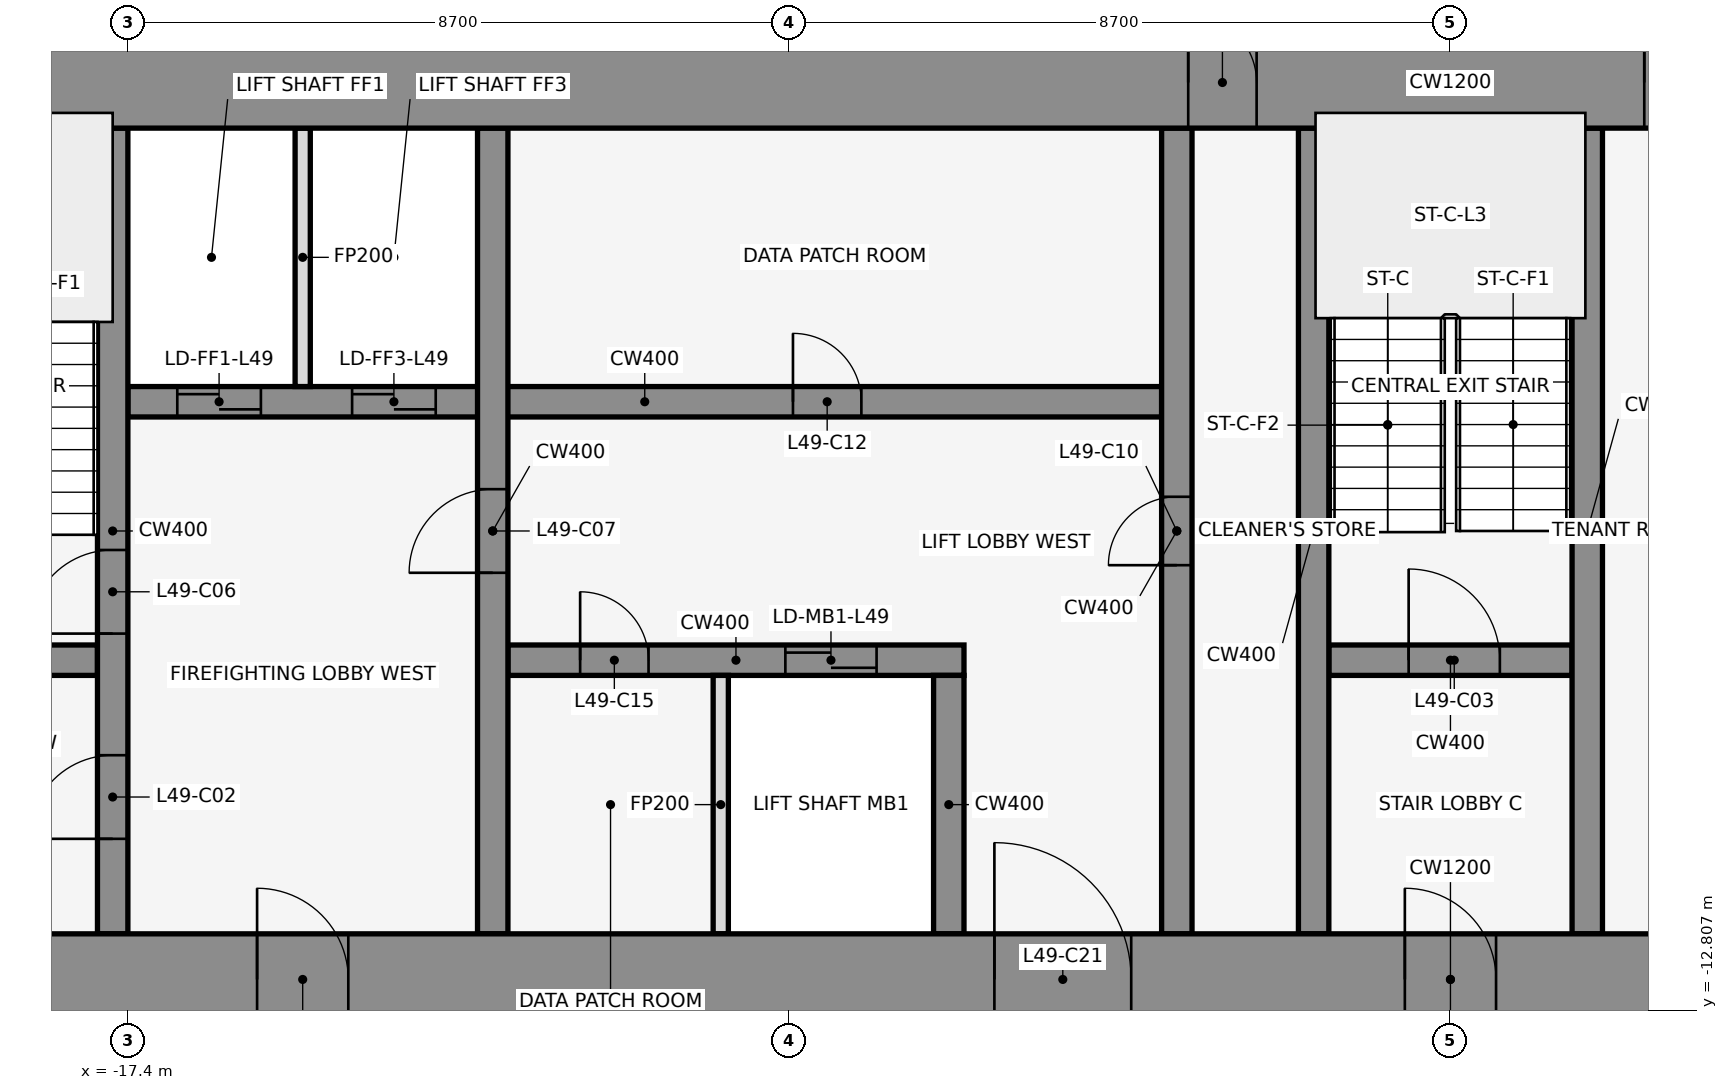
"""IFC4 building model, lengths in metres.
Left out: names, types, materials, properties, quantities, classifications, styles, units other than length and angle.
Written with IfcOpenShell. Run it as: python <this file> out.ifc"""

import sys

from ifc_helpers import new_model, si_unit, direction, frame, frame_2d, origin, place, context, subcontext, project, spatial, rectangle, extrude, element, fill, save


model = new_model("IFC4")
c1 = context("Model", 3, precision=1e-05, world=origin(), true_north=direction((0.0, 1.0)))
c2 = subcontext(c1, "Body", "Model", "MODEL_VIEW")
j1 = project(units=[si_unit("LENGTHUNIT", "METRE"), si_unit("PLANEANGLEUNIT", "RADIAN")], contexts=[c1])
p1 = place(None, origin())
s1 = spatial("IfcSite", under=j1, at=p1, CompositionType="ELEMENT")
p2 = place(p1, origin())
s2 = spatial("IfcBuilding", under=s1, at=p2, CompositionType="ELEMENT")
p3 = place(p2, frame((0.0, 0.0, 219.6)))
s3 = spatial("IfcBuildingStorey", under=s2, at=p3, CompositionType="ELEMENT", Elevation=219.6)
for number, where, z_axis, x_axis in (
    (1, (1.901, 1.08, 0.0), (0.0, 0.0, 1.0), (-0.84, -0.543, 0.0)),
    (2, (-0.068, -0.105, 0.0), (0.0, 0.0, 1.0), (-0.84, 0.543, 0.0)),
    (3, (-14.599, 1.08, 0.0), (0.0, 0.0, 1.0), (-0.84, -0.543, 0.0)),
):
    element("IfcWall", number, at=place(p3, frame(where, z_axis=z_axis, x_axis=x_axis)), inside=s3, PredefinedType="STANDARD", context=c2, shape_type="SweptSolid", body=[
        extrude(rectangle(XDim=2.183, YDim=0.25, at=frame_2d((1.091, 0.0))), origin(), (0.0, 0.0, 1.0), 3.95),
    ])
p4 = place(p3, frame((-20.8, -8.2, 0.0), z_axis=(0.0, 0.0, 1.0), x_axis=(1.0, 0.0, 0.0)))
e4 = element("IfcWall", 4, at=p4, inside=s3, PredefinedType="SHEAR", context=c2, shape_type="SweptSolid", body=[
    extrude(rectangle(XDim=3.0, YDim=0.4, at=frame_2d((1.5, 0.0))), origin(), (0.0, 0.0, 1.0), 4.1),
])
p5 = place(p4, frame((0.85, 0.0, 0.0)))
e5 = element("IfcOpeningElement", 5, at=p5, cuts=e4, PredefinedType="OPENING", context=c2, shape_type="SweptSolid", body=[
    extrude(rectangle(XDim=1.2, YDim=2.1, at=frame_2d((0.6, 1.05))), frame((0.0, 0.212, 0.0), z_axis=(0.0, -1.0, 0.0), x_axis=(1.0, 0.0, 0.0)), (0.0, 0.0, 1.0), 0.424),
])
p6 = place(p3, frame((-12.4, -8.2, 0.0), z_axis=(0.0, 0.0, 1.0), x_axis=(1.0, 0.0, 0.0)))
e6 = element("IfcWall", 6, at=p6, inside=s3, PredefinedType="SHEAR", context=c2, shape_type="SweptSolid", body=[
    extrude(rectangle(XDim=6.0, YDim=0.4, at=frame_2d((3.0, 0.0))), origin(), (0.0, 0.0, 1.0), 4.1),
])
p7 = place(p6, frame((3.65, 0.0, 0.0)))
e7 = element("IfcOpeningElement", 7, at=p7, cuts=e6, PredefinedType="OPENING", context=c2, shape_type="SweptSolid", body=[
    extrude(rectangle(XDim=1.2, YDim=2.1, at=frame_2d((0.6, 1.05))), frame((0.0, 0.212, 0.0), z_axis=(0.0, -1.0, 0.0), x_axis=(1.0, 0.0, 0.0)), (0.0, 0.0, 1.0), 0.424),
])
p8 = place(p6, frame((0.95, 0.0, 0.0)))
e8 = element("IfcOpeningElement", 8, at=p8, cuts=e6, PredefinedType="OPENING", context=c2, shape_type="SweptSolid", body=[
    extrude(rectangle(XDim=0.9, YDim=2.1, at=frame_2d((0.45, 1.05))), frame((0.0, 0.212, 0.0), z_axis=(0.0, -1.0, 0.0), x_axis=(1.0, 0.0, 0.0)), (0.0, 0.0, 1.0), 0.424),
])
p9 = place(p3, frame((-1.6, -8.2, 0.0), z_axis=(0.0, 0.0, 1.0), x_axis=(1.0, 0.0, 0.0)))
e9 = element("IfcWall", 9, at=p9, inside=s3, PredefinedType="SHEAR", context=c2, shape_type="SweptSolid", body=[
    extrude(rectangle(XDim=3.2, YDim=0.4, at=frame_2d((1.6, 0.0))), origin(), (0.0, 0.0, 1.0), 4.1),
])
p10 = place(p9, frame((1.05, 0.0, 0.0)))
e10 = element("IfcOpeningElement", 10, at=p10, cuts=e9, PredefinedType="OPENING", context=c2, shape_type="SweptSolid", body=[
    extrude(rectangle(XDim=1.2, YDim=2.1, at=frame_2d((0.6, 1.05))), frame((0.0, 0.212, 0.0), z_axis=(0.0, -1.0, 0.0), x_axis=(1.0, 0.0, 0.0)), (0.0, 0.0, 1.0), 0.424),
])
p11 = place(p3, frame((-17.4, -4.8, 0.0), z_axis=(0.0, 0.0, 1.0), x_axis=(1.0, 0.0, 0.0)))
e11 = element("IfcWall", 11, at=p11, inside=s3, PredefinedType="SHEAR", context=c2, shape_type="SweptSolid", body=[
    extrude(rectangle(XDim=13.6, YDim=0.4, at=frame_2d((6.8, 0.0))), origin(), (0.0, 0.0, 1.0), 4.1),
])
p12 = place(p11, frame((0.65, 0.0, 0.0)))
e12 = element("IfcOpeningElement", 12, at=p12, cuts=e11, PredefinedType="OPENING", context=c2, shape_type="SweptSolid", body=[
    extrude(rectangle(XDim=1.1, YDim=2.1, at=frame_2d((0.55, 1.05))), frame((0.0, 0.212, 0.0), z_axis=(0.0, -1.0, 0.0), x_axis=(1.0, 0.0, 0.0)), (0.0, 0.0, 1.0), 0.424),
])
p13 = place(p11, frame((2.95, 0.0, 0.0)))
e13 = element("IfcOpeningElement", 13, at=p13, cuts=e11, PredefinedType="OPENING", context=c2, shape_type="SweptSolid", body=[
    extrude(rectangle(XDim=1.1, YDim=2.1, at=frame_2d((0.55, 1.05))), frame((0.0, 0.212, 0.0), z_axis=(0.0, -1.0, 0.0), x_axis=(1.0, 0.0, 0.0)), (0.0, 0.0, 1.0), 0.424),
])
p14 = place(p11, frame((8.75, 0.0, 0.0)))
e14 = element("IfcOpeningElement", 14, at=p14, cuts=e11, PredefinedType="OPENING", context=c2, shape_type="SweptSolid", body=[
    extrude(rectangle(XDim=0.9, YDim=2.1, at=frame_2d((0.45, 1.05))), frame((0.0, 0.212, 0.0), z_axis=(0.0, -1.0, 0.0), x_axis=(1.0, 0.0, 0.0)), (0.0, 0.0, 1.0), 0.424),
])
p15 = place(p3, frame((-17.6, -11.8, 0.0), z_axis=(0.0, 0.0, 1.0), x_axis=(0.0, 1.0, 0.0)))
e15 = element("IfcWall", 15, at=p15, inside=s3, PredefinedType="SHEAR", context=c2, shape_type="SweptSolid", body=[
    extrude(rectangle(XDim=10.6, YDim=0.4, at=frame_2d((5.3, 0.0))), origin(), (0.0, 0.0, 1.0), 4.1),
])
p16 = place(p15, frame((1.25, 0.0, 0.0)))
e16 = element("IfcOpeningElement", 16, at=p16, cuts=e15, PredefinedType="OPENING", context=c2, shape_type="SweptSolid", body=[
    extrude(rectangle(XDim=1.1, YDim=2.1, at=frame_2d((0.55, 1.05))), frame((0.0, 0.212, 0.0), z_axis=(0.0, -1.0, 0.0), x_axis=(1.0, 0.0, 0.0)), (0.0, 0.0, 1.0), 0.424),
])
p17 = place(p15, frame((3.95, 0.0, 0.0)))
e17 = element("IfcOpeningElement", 17, at=p17, cuts=e15, PredefinedType="OPENING", context=c2, shape_type="SweptSolid", body=[
    extrude(rectangle(XDim=1.1, YDim=2.1, at=frame_2d((0.55, 1.05))), frame((0.0, 0.212, 0.0), z_axis=(0.0, -1.0, 0.0), x_axis=(1.0, 0.0, 0.0)), (0.0, 0.0, 1.0), 0.424),
])
p18 = place(p3, frame((-15.1, -4.6, 0.0), z_axis=(0.0, 0.0, 1.0), x_axis=(0.0, 1.0, 0.0)))
e18 = element("IfcWall", 18, at=p18, inside=s3, PredefinedType="PARTITIONING", context=c2, shape_type="SweptSolid", body=[
    extrude(rectangle(XDim=3.4, YDim=0.2, at=frame_2d((1.7, 0.0))), origin(), (0.0, 0.0, 1.0), 2.84),
])
p19 = place(p3, frame((-12.6, -11.8, 0.0), z_axis=(0.0, 0.0, 1.0), x_axis=(0.0, 1.0, 0.0)))
e19 = element("IfcWall", 19, at=p19, inside=s3, PredefinedType="SHEAR", context=c2, shape_type="SweptSolid", body=[
    extrude(rectangle(XDim=10.6, YDim=0.4, at=frame_2d((5.3, 0.0))), origin(), (0.0, 0.0, 1.0), 4.1),
])
p20 = place(p19, frame((4.75, 0.0, 0.0)))
e20 = element("IfcOpeningElement", 20, at=p20, cuts=e19, PredefinedType="OPENING", context=c2, shape_type="SweptSolid", body=[
    extrude(rectangle(XDim=1.1, YDim=2.1, at=frame_2d((0.55, 1.05))), frame((0.0, 0.212, 0.0), z_axis=(0.0, -1.0, 0.0), x_axis=(1.0, 0.0, 0.0)), (0.0, 0.0, 1.0), 0.424),
])
p21 = place(p3, frame((-9.6, -11.8, 0.0), z_axis=(0.0, 0.0, 1.0), x_axis=(0.0, 1.0, 0.0)))
e21 = element("IfcWall", 21, at=p21, inside=s3, PredefinedType="PARTITIONING", context=c2, shape_type="SweptSolid", body=[
    extrude(rectangle(XDim=3.4, YDim=0.2, at=frame_2d((1.7, 0.0))), origin(), (0.0, 0.0, 1.0), 2.84),
])
p22 = place(p3, frame((-6.6, -11.8, 0.0), z_axis=(0.0, 0.0, 1.0), x_axis=(0.0, 1.0, 0.0)))
e22 = element("IfcWall", 22, at=p22, inside=s3, PredefinedType="SHEAR", context=c2, shape_type="SweptSolid", body=[
    extrude(rectangle(XDim=3.4, YDim=0.4, at=frame_2d((1.7, 0.0))), origin(), (0.0, 0.0, 1.0), 4.1),
])
p23 = place(p3, frame((-3.6, -11.8, 0.0), z_axis=(0.0, 0.0, 1.0), x_axis=(0.0, 1.0, 0.0)))
e23 = element("IfcWall", 23, at=p23, inside=s3, PredefinedType="SHEAR", context=c2, shape_type="SweptSolid", body=[
    extrude(rectangle(XDim=10.6, YDim=0.4, at=frame_2d((5.3, 0.0))), origin(), (0.0, 0.0, 1.0), 4.1),
])
p24 = place(p23, frame((4.85, 0.0, 0.0)))
e24 = element("IfcOpeningElement", 24, at=p24, cuts=e23, PredefinedType="OPENING", context=c2, shape_type="SweptSolid", body=[
    extrude(rectangle(XDim=0.9, YDim=2.1, at=frame_2d((0.45, 1.05))), frame((0.0, 0.212, 0.0), z_axis=(0.0, -1.0, 0.0), x_axis=(1.0, 0.0, 0.0)), (0.0, 0.0, 1.0), 0.424),
])
for number, where, z_axis, x_axis in (
    (25, (-1.8, -11.8, 0.0), (0.0, 0.0, 1.0), (0.0, 1.0, 0.0)),
    (26, (1.8, -11.8, 0.0), (0.0, 0.0, 1.0), (0.0, 1.0, 0.0)),
):
    element("IfcWall", number, at=place(p3, frame(where, z_axis=z_axis, x_axis=x_axis)), inside=s3, PredefinedType="SHEAR", context=c2, shape_type="SweptSolid", body=[
        extrude(rectangle(XDim=10.6, YDim=0.4, at=frame_2d((5.3, 0.0))), origin(), (0.0, 0.0, 1.0), 4.1),
    ])
p25 = place(p3, frame((-22.0, -0.6, 0.0), z_axis=(0.0, 0.0, 1.0), x_axis=(1.0, 0.0, 0.0)))
e27 = element("IfcWall", 27, at=p25, inside=s3, PredefinedType="SHEAR", context=c2, shape_type="SweptSolid", body=[
    extrude(rectangle(XDim=44.0, YDim=1.2, at=frame_2d((22.0, 0.0))), origin(), (0.0, 0.0, 1.0), 4.1),
])
p26 = place(p25, frame((18.55, 0.0, 0.0)))
e28 = element("IfcOpeningElement", 28, at=p26, cuts=e27, PredefinedType="OPENING", context=c2, shape_type="SweptSolid", body=[
    extrude(rectangle(XDim=0.9, YDim=2.1, at=frame_2d((0.45, 1.05))), frame((0.0, 0.612, 0.0), z_axis=(0.0, -1.0, 0.0), x_axis=(1.0, 0.0, 0.0)), (0.0, 0.0, 1.0), 1.224),
])
p27 = place(p25, frame((24.55, 0.0, 0.0)))
e29 = element("IfcOpeningElement", 29, at=p27, cuts=e27, PredefinedType="OPENING", context=c2, shape_type="SweptSolid", body=[
    extrude(rectangle(XDim=0.9, YDim=2.1, at=frame_2d((0.45, 1.05))), frame((0.0, 0.612, 0.0), z_axis=(0.0, -1.0, 0.0), x_axis=(1.0, 0.0, 0.0)), (0.0, 0.0, 1.0), 1.224),
])
p28 = place(p3, frame((-22.0, -12.4, 0.0), z_axis=(0.0, 0.0, 1.0), x_axis=(1.0, 0.0, 0.0)))
e30 = element("IfcWall", 30, at=p28, inside=s3, PredefinedType="SHEAR", context=c2, shape_type="SweptSolid", body=[
    extrude(rectangle(XDim=44.0, YDim=1.2, at=frame_2d((22.0, 0.0))), origin(), (0.0, 0.0, 1.0), 4.1),
])
p29 = place(p28, frame((2.2, 0.0, 0.0)))
e31 = element("IfcOpeningElement", 31, at=p29, cuts=e30, PredefinedType="OPENING", context=c2, shape_type="SweptSolid", body=[
    extrude(rectangle(XDim=1.2, YDim=2.1, at=frame_2d((0.6, 1.05))), frame((0.0, 0.612, 0.0), z_axis=(0.0, -1.0, 0.0), x_axis=(1.0, 0.0, 0.0)), (0.0, 0.0, 1.0), 1.224),
])
p30 = place(p28, frame((21.4, 0.0, 0.0)))
e32 = element("IfcOpeningElement", 32, at=p30, cuts=e30, PredefinedType="OPENING", context=c2, shape_type="SweptSolid", body=[
    extrude(rectangle(XDim=1.2, YDim=2.1, at=frame_2d((0.6, 1.05))), frame((0.0, 0.612, 0.0), z_axis=(0.0, -1.0, 0.0), x_axis=(1.0, 0.0, 0.0)), (0.0, 0.0, 1.0), 1.224),
])
p31 = place(p28, frame((40.6, 0.0, 0.0)))
e33 = element("IfcOpeningElement", 33, at=p31, cuts=e30, PredefinedType="OPENING", context=c2, shape_type="SweptSolid", body=[
    extrude(rectangle(XDim=1.2, YDim=2.1, at=frame_2d((0.6, 1.05))), frame((0.0, 0.612, 0.0), z_axis=(0.0, -1.0, 0.0), x_axis=(1.0, 0.0, 0.0)), (0.0, 0.0, 1.0), 1.224),
])
p32 = place(p28, frame((16.0, 0.0, 0.0)))
e34 = element("IfcOpeningElement", 34, at=p32, cuts=e30, PredefinedType="OPENING", context=c2, shape_type="SweptSolid", body=[
    extrude(rectangle(XDim=1.8, YDim=2.1, at=frame_2d((0.9, 1.05))), frame((0.0, 0.612, 0.0), z_axis=(0.0, -1.0, 0.0), x_axis=(1.0, 0.0, 0.0)), (0.0, 0.0, 1.0), 1.224),
])
p33 = place(p28, frame((6.3, 0.0, 0.0)))
e35 = element("IfcOpeningElement", 35, at=p33, cuts=e30, PredefinedType="OPENING", context=c2, shape_type="SweptSolid", body=[
    extrude(rectangle(XDim=1.2, YDim=2.1, at=frame_2d((0.6, 1.05))), frame((0.0, 0.612, 0.0), z_axis=(0.0, -1.0, 0.0), x_axis=(1.0, 0.0, 0.0)), (0.0, 0.0, 1.0), 1.224),
])
p34 = place(p28, frame((26.2, 0.0, 0.0)))
e36 = element("IfcOpeningElement", 36, at=p34, cuts=e30, PredefinedType="OPENING", context=c2, shape_type="SweptSolid", body=[
    extrude(rectangle(XDim=1.8, YDim=2.1, at=frame_2d((0.9, 1.05))), frame((0.0, 0.612, 0.0), z_axis=(0.0, -1.0, 0.0), x_axis=(1.0, 0.0, 0.0)), (0.0, 0.0, 1.0), 1.224),
])
p35 = place(p28, frame((36.5, 0.0, 0.0)))
e37 = element("IfcOpeningElement", 37, at=p35, cuts=e30, PredefinedType="OPENING", context=c2, shape_type="SweptSolid", body=[
    extrude(rectangle(XDim=1.2, YDim=2.1, at=frame_2d((0.6, 1.05))), frame((0.0, 0.612, 0.0), z_axis=(0.0, -1.0, 0.0), x_axis=(1.0, 0.0, 0.0)), (0.0, 0.0, 1.0), 1.224),
])
p36 = place(p16, frame((1.1, 0.0, 0.0), z_axis=(0.0, 0.0, 1.0), x_axis=(-1.0, 0.0, 0.0)))
e38 = element("IfcDoor", 38, at=p36, inside=s3, OperationType="SINGLE_SWING_LEFT", PredefinedType="DOOR", context=c2, shape_type="SweptSolid", body=[
    extrude(rectangle(XDim=1.1, YDim=2.1, at=frame_2d((0.55, 1.05))), frame((0.0, 0.025, 0.0), z_axis=(0.0, -1.0, 0.0), x_axis=(1.0, 0.0, 0.0)), (0.0, 0.0, 1.0), 0.05),
])
fill(e16, e38)
p37 = place(p10, origin())
e39 = element("IfcDoor", 39, at=p37, inside=s3, OperationType="SINGLE_SWING_LEFT", PredefinedType="DOOR", context=c2, shape_type="SweptSolid", body=[
    extrude(rectangle(XDim=1.2, YDim=2.1, at=frame_2d((0.6, 1.05))), frame((0.0, 0.025, 0.0), z_axis=(0.0, -1.0, 0.0), x_axis=(1.0, 0.0, 0.0)), (0.0, 0.0, 1.0), 0.05),
])
fill(e10, e39)
p38 = place(p12, origin())
e40 = element("IfcDoor", 40, at=p38, inside=s3, OperationType="DOUBLE_DOOR_SLIDING", PredefinedType="DOOR", context=c2, shape_type="SweptSolid", body=[
    extrude(rectangle(XDim=1.1, YDim=2.1, at=frame_2d((0.55, 1.05))), frame((0.0, 0.025, 0.0), z_axis=(0.0, -1.0, 0.0), x_axis=(1.0, 0.0, 0.0)), (0.0, 0.0, 1.0), 0.05),
])
fill(e12, e40)
p39 = place(p13, origin())
e41 = element("IfcDoor", 41, at=p39, inside=s3, OperationType="DOUBLE_DOOR_SLIDING", PredefinedType="DOOR", context=c2, shape_type="SweptSolid", body=[
    extrude(rectangle(XDim=1.1, YDim=2.1, at=frame_2d((0.55, 1.05))), frame((0.0, 0.025, 0.0), z_axis=(0.0, -1.0, 0.0), x_axis=(1.0, 0.0, 0.0)), (0.0, 0.0, 1.0), 0.05),
])
fill(e13, e41)
p40 = place(p7, origin())
e42 = element("IfcDoor", 42, at=p40, inside=s3, OperationType="DOUBLE_DOOR_SLIDING", PredefinedType="DOOR", context=c2, shape_type="SweptSolid", body=[
    extrude(rectangle(XDim=1.2, YDim=2.1, at=frame_2d((0.6, 1.05))), frame((0.0, 0.025, 0.0), z_axis=(0.0, -1.0, 0.0), x_axis=(1.0, 0.0, 0.0)), (0.0, 0.0, 1.0), 0.05),
])
fill(e7, e42)
p41 = place(p17, frame((1.1, 0.0, 0.0), z_axis=(0.0, 0.0, 1.0), x_axis=(-1.0, 0.0, 0.0)))
e43 = element("IfcDoor", 43, at=p41, inside=s3, OperationType="SINGLE_SWING_LEFT", PredefinedType="DOOR", context=c2, shape_type="SweptSolid", body=[
    extrude(rectangle(XDim=1.1, YDim=2.1, at=frame_2d((0.55, 1.05))), frame((0.0, 0.025, 0.0), z_axis=(0.0, -1.0, 0.0), x_axis=(1.0, 0.0, 0.0)), (0.0, 0.0, 1.0), 0.05),
])
fill(e17, e43)
p42 = place(p20, origin())
e44 = element("IfcDoor", 44, at=p42, inside=s3, OperationType="SINGLE_SWING_LEFT", PredefinedType="DOOR", context=c2, shape_type="SweptSolid", body=[
    extrude(rectangle(XDim=1.1, YDim=2.1, at=frame_2d((0.55, 1.05))), frame((0.0, 0.025, 0.0), z_axis=(0.0, -1.0, 0.0), x_axis=(1.0, 0.0, 0.0)), (0.0, 0.0, 1.0), 0.05),
])
fill(e20, e44)
p43 = place(p24, frame((0.9, 0.0, 0.0), z_axis=(0.0, 0.0, 1.0), x_axis=(-1.0, 0.0, 0.0)))
e45 = element("IfcDoor", 45, at=p43, inside=s3, OperationType="SINGLE_SWING_LEFT", PredefinedType="DOOR", context=c2, shape_type="SweptSolid", body=[
    extrude(rectangle(XDim=0.9, YDim=2.1, at=frame_2d((0.45, 1.05))), frame((0.0, 0.025, 0.0), z_axis=(0.0, -1.0, 0.0), x_axis=(1.0, 0.0, 0.0)), (0.0, 0.0, 1.0), 0.05),
])
fill(e24, e45)
p44 = place(p14, origin())
e46 = element("IfcDoor", 46, at=p44, inside=s3, OperationType="SINGLE_SWING_RIGHT", PredefinedType="DOOR", context=c2, shape_type="SweptSolid", body=[
    extrude(rectangle(XDim=0.9, YDim=2.1, at=frame_2d((0.45, 1.05))), frame((0.0, 0.025, 0.0), z_axis=(0.0, -1.0, 0.0), x_axis=(1.0, 0.0, 0.0)), (0.0, 0.0, 1.0), 0.05),
])
fill(e14, e46)
p45 = place(p8, frame((0.9, 0.0, 0.0), z_axis=(0.0, 0.0, 1.0), x_axis=(-1.0, 0.0, 0.0)))
e47 = element("IfcDoor", 47, at=p45, inside=s3, OperationType="SINGLE_SWING_RIGHT", PredefinedType="DOOR", context=c2, shape_type="SweptSolid", body=[
    extrude(rectangle(XDim=0.9, YDim=2.1, at=frame_2d((0.45, 1.05))), frame((0.0, 0.025, 0.0), z_axis=(0.0, -1.0, 0.0), x_axis=(1.0, 0.0, 0.0)), (0.0, 0.0, 1.0), 0.05),
])
fill(e8, e47)
p46 = place(p26, origin())
e48 = element("IfcDoor", 48, at=p46, inside=s3, OperationType="SINGLE_SWING_LEFT", PredefinedType="DOOR", context=c2, shape_type="SweptSolid", body=[
    extrude(rectangle(XDim=0.9, YDim=2.1, at=frame_2d((0.45, 1.05))), frame((0.0, 0.025, 0.0), z_axis=(0.0, -1.0, 0.0), x_axis=(1.0, 0.0, 0.0)), (0.0, 0.0, 1.0), 0.05),
])
fill(e28, e48)
p47 = place(p27, origin())
e49 = element("IfcDoor", 49, at=p47, inside=s3, OperationType="SINGLE_SWING_LEFT", PredefinedType="DOOR", context=c2, shape_type="SweptSolid", body=[
    extrude(rectangle(XDim=0.9, YDim=2.1, at=frame_2d((0.45, 1.05))), frame((0.0, 0.025, 0.0), z_axis=(0.0, -1.0, 0.0), x_axis=(1.0, 0.0, 0.0)), (0.0, 0.0, 1.0), 0.05),
])
fill(e29, e49)
p48 = place(p30, frame((1.2, 0.0, 0.0), z_axis=(0.0, 0.0, 1.0), x_axis=(-1.0, 0.0, 0.0)))
e50 = element("IfcDoor", 50, at=p48, inside=s3, OperationType="SINGLE_SWING_RIGHT", PredefinedType="DOOR", context=c2, shape_type="SweptSolid", body=[
    extrude(rectangle(XDim=1.2, YDim=2.1, at=frame_2d((0.6, 1.05))), frame((0.0, 0.025, 0.0), z_axis=(0.0, -1.0, 0.0), x_axis=(1.0, 0.0, 0.0)), (0.0, 0.0, 1.0), 0.05),
])
fill(e32, e50)
p49 = place(p32, origin())
e51 = element("IfcDoor", 51, at=p49, inside=s3, OperationType="SINGLE_SWING_LEFT", PredefinedType="DOOR", context=c2, shape_type="SweptSolid", body=[
    extrude(rectangle(XDim=1.8, YDim=2.1, at=frame_2d((0.9, 1.05))), frame((0.0, 0.025, 0.0), z_axis=(0.0, -1.0, 0.0), x_axis=(1.0, 0.0, 0.0)), (0.0, 0.0, 1.0), 0.05),
])
fill(e34, e51)
p50 = place(p33, frame((1.2, 0.0, 0.0), z_axis=(0.0, 0.0, 1.0), x_axis=(-1.0, 0.0, 0.0)))
e52 = element("IfcDoor", 52, at=p50, inside=s3, OperationType="SINGLE_SWING_RIGHT", PredefinedType="DOOR", context=c2, shape_type="SweptSolid", body=[
    extrude(rectangle(XDim=1.2, YDim=2.1, at=frame_2d((0.6, 1.05))), frame((0.0, 0.025, 0.0), z_axis=(0.0, -1.0, 0.0), x_axis=(1.0, 0.0, 0.0)), (0.0, 0.0, 1.0), 0.05),
])
fill(e35, e52)
save(model, sys.argv[1])
